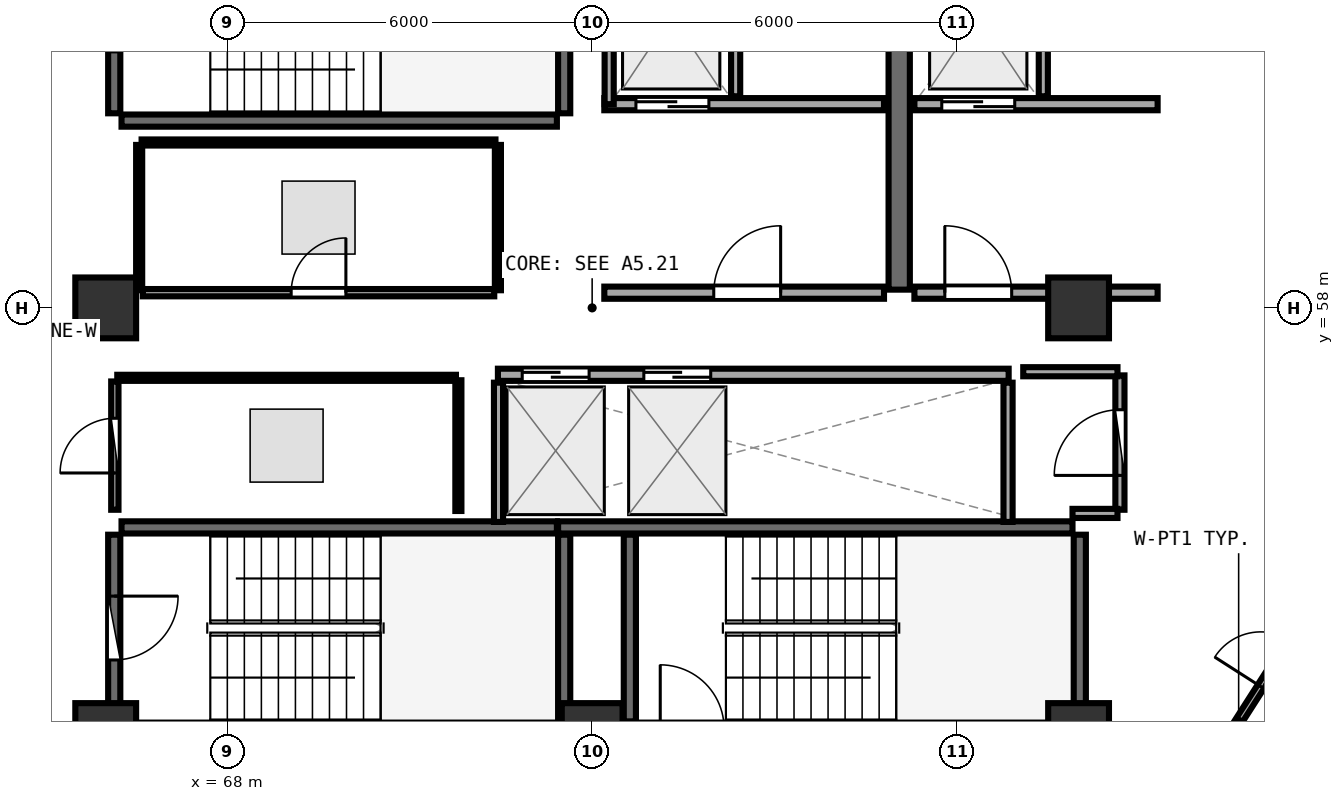
"""IFC4 building model, lengths in metres.
Left out: names, types, materials, properties, quantities, classifications, styles, units other than length and angle.
Written with IfcOpenShell. Run it as: python <this file> out.ifc"""

import sys

from ifc_helpers import new_model, si_unit, direction, frame, frame_2d, origin, origin_2d, place, context, subcontext, project, spatial, rectangle, extrude, element, fill, save


model = new_model("IFC4")
c1 = context("Model", 3, precision=1e-05, world=origin(), true_north=direction((0.0, 1.0)))
c2 = subcontext(c1, "Body", "Model", "MODEL_VIEW")
j1 = project(units=[si_unit("LENGTHUNIT", "METRE"), si_unit("PLANEANGLEUNIT", "RADIAN")], contexts=[c1])
p1 = place(None, origin())
s1 = spatial("IfcSite", under=j1, at=p1, CompositionType="ELEMENT")
p2 = place(p1, origin())
s2 = spatial("IfcBuilding", under=s1, at=p2, CompositionType="ELEMENT")
p3 = place(p2, frame((0.0, 0.0, 271.2)))
s3 = spatial("IfcBuildingStorey", under=s2, at=p3, CompositionType="ELEMENT", Elevation=271.2)
for number, where, z_axis, x_axis in (
    (1, (66.0, 51.0, 0.0), (0.0, 0.0, 1.0), (1.0, 0.0, 0.0)),
    (2, (74.0, 51.0, 0.0), (0.0, 0.0, 1.0), (1.0, 0.0, 0.0)),
    (3, (82.0, 51.0, 0.0), (0.0, 0.0, 1.0), (1.0, 0.0, 0.0)),
    (4, (82.0, 58.0, 0.0), (0.0, 0.0, 1.0), (1.0, 0.0, 0.0)),
    (5, (66.0, 58.0, 0.0), (0.0, 0.0, 1.0), (1.0, 0.0, 0.0)),
):
    element("IfcColumn", number, at=place(p3, frame(where, z_axis=z_axis, x_axis=x_axis)), inside=s3, PredefinedType="PILASTER", context=c2, shape_type="SweptSolid", body=[
        extrude(rectangle(XDim=1.0, YDim=1.0, at=origin_2d()), origin(), (0.0, 0.0, 1.0), 3.75),
    ])
p4 = place(p3, frame((66.26, 61.08, 0.0), z_axis=(0.0, 0.0, 1.0), x_axis=(1.0, 0.0, 0.0)))
e6 = element("IfcWall", 6, at=p4, inside=s3, PredefinedType="SHEAR", context=c2, shape_type="SweptSolid", body=[
    extrude(rectangle(XDim=7.16, YDim=0.2, at=frame_2d((3.58, 0.0))), origin(), (0.0, 0.0, 1.0), 3.49),
])
p5 = place(p3, frame((73.54, 61.2, 0.0), z_axis=(0.0, 0.0, 1.0), x_axis=(0.0, 1.0, 0.0)))
e7 = element("IfcWall", 7, at=p5, inside=s3, PredefinedType="SHEAR", context=c2, shape_type="SweptSolid", body=[
    extrude(rectangle(XDim=3.07, YDim=0.2, at=frame_2d((1.535, 0.0))), origin(), (0.0, 0.0, 1.0), 3.49),
])
p6 = place(p3, frame((66.14, 64.27, 0.0), z_axis=(0.0, 0.0, 1.0), x_axis=(0.0, -1.0, 0.0)))
e8 = element("IfcWall", 8, at=p6, inside=s3, PredefinedType="SHEAR", context=c2, shape_type="SweptSolid", body=[
    extrude(rectangle(XDim=3.07, YDim=0.2, at=frame_2d((1.535, 0.0))), origin(), (0.0, 0.0, 1.0), 3.49),
])
p7 = place(p6, frame((1.01, 0.0, 0.0)))
e9 = element("IfcOpeningElement", 9, at=p7, cuts=e8, PredefinedType="OPENING", context=c2, shape_type="SweptSolid", body=[
    extrude(rectangle(XDim=1.05, YDim=2.1, at=frame_2d((0.525, 1.05))), frame((0.0, 0.11, 0.0), z_axis=(0.0, -1.0, 0.0), x_axis=(1.0, 0.0, 0.0)), (0.0, 0.0, 1.0), 0.22),
])
p8 = place(p3, frame((82.02, 51.2, 0.0), z_axis=(0.0, 0.0, 1.0), x_axis=(0.0, 1.0, 0.0)))
e10 = element("IfcWall", 10, at=p8, inside=s3, PredefinedType="SHEAR", context=c2, shape_type="SweptSolid", body=[
    extrude(rectangle(XDim=3.07, YDim=0.2, at=frame_2d((1.535, 0.0))), origin(), (0.0, 0.0, 1.0), 3.49),
])
p9 = place(p3, frame((81.9, 54.39, 0.0), z_axis=(0.0, 0.0, 1.0), x_axis=(-1.0, 0.0, 0.0)))
e11 = element("IfcWall", 11, at=p9, inside=s3, PredefinedType="SHEAR", context=c2, shape_type="SweptSolid", body=[
    extrude(rectangle(XDim=8.46, YDim=0.2, at=frame_2d((4.23, 0.0))), origin(), (0.0, 0.0, 1.0), 3.49),
])
for number, where, z_axis, x_axis in (
    (12, (74.62, 54.27, 0.0), (0.0, 0.0, 1.0), (0.0, -1.0, 0.0)),
    (13, (73.54, 51.2, 0.0), (0.0, 0.0, 1.0), (0.0, 1.0, 0.0)),
):
    element("IfcWall", number, at=place(p3, frame(where, z_axis=z_axis, x_axis=x_axis)), inside=s3, PredefinedType="SHEAR", context=c2, shape_type="SweptSolid", body=[
        extrude(rectangle(XDim=3.07, YDim=0.2, at=frame_2d((1.535, 0.0))), origin(), (0.0, 0.0, 1.0), 3.49),
    ])
p10 = place(p3, frame((73.42, 54.39, 0.0), z_axis=(0.0, 0.0, 1.0), x_axis=(-1.0, 0.0, 0.0)))
e14 = element("IfcWall", 14, at=p10, inside=s3, PredefinedType="SHEAR", context=c2, shape_type="SweptSolid", body=[
    extrude(rectangle(XDim=7.16, YDim=0.2, at=frame_2d((3.58, 0.0))), origin(), (0.0, 0.0, 1.0), 3.49),
])
p11 = place(p3, frame((66.14, 54.27, 0.0), z_axis=(0.0, 0.0, 1.0), x_axis=(0.0, -1.0, 0.0)))
e15 = element("IfcWall", 15, at=p11, inside=s3, PredefinedType="SHEAR", context=c2, shape_type="SweptSolid", body=[
    extrude(rectangle(XDim=3.07, YDim=0.2, at=frame_2d((1.535, 0.0))), origin(), (0.0, 0.0, 1.0), 3.49),
])
p12 = place(p11, frame((1.01, 0.0, 0.0)))
e16 = element("IfcOpeningElement", 16, at=p12, cuts=e15, PredefinedType="OPENING", context=c2, shape_type="SweptSolid", body=[
    extrude(rectangle(XDim=1.05, YDim=2.1, at=frame_2d((0.525, 1.05))), frame((0.0, 0.11, 0.0), z_axis=(0.0, -1.0, 0.0), x_axis=(1.0, 0.0, 0.0)), (0.0, 0.0, 1.0), 0.22),
])
p13 = place(p3, frame((79.05, 58.3, 0.0), z_axis=(0.0, 0.0, 1.0), x_axis=(0.0, 1.0, 0.0)))
e17 = element("IfcWall", 17, at=p13, inside=s3, PredefinedType="SHEAR", context=c2, shape_type="SweptSolid", body=[
    extrude(rectangle(XDim=6.3, YDim=0.35, at=frame_2d((3.15, 0.0))), origin(), (0.0, 0.0, 1.0), 3.49),
])
p14 = place(p3, frame((74.2, 61.35, 0.0), z_axis=(0.0, 0.0, 1.0), x_axis=(1.0, 0.0, 0.0)))
e18 = element("IfcWall", 18, at=p14, inside=s3, PredefinedType="SOLIDWALL", context=c2, shape_type="SweptSolid", body=[
    extrude(rectangle(XDim=4.6, YDim=0.2, at=frame_2d((2.3, 0.0))), origin(), (0.0, 0.0, 1.0), 3.48),
])
p15 = place(p14, frame((0.52, 0.0, 0.0)))
e19 = element("IfcOpeningElement", 19, at=p15, cuts=e18, PredefinedType="OPENING", context=c2, shape_type="SweptSolid", body=[
    extrude(rectangle(XDim=1.2, YDim=2.15, at=frame_2d((0.6, 1.075))), frame((0.0, 0.11, 0.0), z_axis=(0.0, -1.0, 0.0), x_axis=(1.0, 0.0, 0.0)), (0.0, 0.0, 1.0), 0.22),
])
p16 = place(p3, frame((74.28, 61.35, 0.0), z_axis=(0.0, 0.0, 1.0), x_axis=(0.0, 1.0, 0.0)))
e20 = element("IfcWall", 20, at=p16, inside=s3, PredefinedType="PARTITIONING", context=c2, shape_type="SweptSolid", body=[
    extrude(rectangle(XDim=2.97, YDim=0.15, at=frame_2d((1.485, 0.0))), origin(), (0.0, 0.0, 1.0), 3.48),
])
p17 = place(p3, frame((76.36, 61.48, 0.0), z_axis=(0.0, 0.0, 1.0), x_axis=(0.0, 1.0, 0.0)))
e21 = element("IfcWall", 21, at=p17, inside=s3, PredefinedType="PARTITIONING", context=c2, shape_type="SweptSolid", body=[
    extrude(rectangle(XDim=2.84, YDim=0.15, at=frame_2d((1.42, 0.0))), origin(), (0.0, 0.0, 1.0), 3.48),
])
p18 = place(p3, frame((79.3, 61.35, 0.0), z_axis=(0.0, 0.0, 1.0), x_axis=(1.0, 0.0, 0.0)))
e22 = element("IfcWall", 22, at=p18, inside=s3, PredefinedType="SOLIDWALL", context=c2, shape_type="SweptSolid", body=[
    extrude(rectangle(XDim=4.0, YDim=0.2, at=frame_2d((2.0, 0.0))), origin(), (0.0, 0.0, 1.0), 2.775),
])
p19 = place(p18, frame((0.45, 0.0, 0.0)))
e23 = element("IfcOpeningElement", 23, at=p19, cuts=e22, PredefinedType="OPENING", context=c2, shape_type="SweptSolid", body=[
    extrude(rectangle(XDim=1.2, YDim=2.15, at=frame_2d((0.6, 1.075))), frame((0.0, 0.11, 0.0), z_axis=(0.0, -1.0, 0.0), x_axis=(1.0, 0.0, 0.0)), (0.0, 0.0, 1.0), 0.22),
])
p20 = place(p3, frame((81.42, 61.48, 0.0), z_axis=(0.0, 0.0, 1.0), x_axis=(0.0, 1.0, 0.0)))
e24 = element("IfcWall", 24, at=p20, inside=s3, PredefinedType="PARTITIONING", context=c2, shape_type="SweptSolid", body=[
    extrude(rectangle(XDim=2.84, YDim=0.15, at=frame_2d((1.42, 0.0))), origin(), (0.0, 0.0, 1.0), 3.48),
])
p21 = place(p3, frame((74.2, 58.25, 0.0), z_axis=(0.0, 0.0, 1.0), x_axis=(1.0, 0.0, 0.0)))
e25 = element("IfcWall", 25, at=p21, inside=s3, PredefinedType="SOLIDWALL", context=c2, shape_type="SweptSolid", body=[
    extrude(rectangle(XDim=4.6, YDim=0.2, at=frame_2d((2.3, 0.0))), origin(), (0.0, 0.0, 1.0), 3.48),
])
p22 = place(p21, frame((1.8, 0.0, 0.0)))
e26 = element("IfcOpeningElement", 26, at=p22, cuts=e25, PredefinedType="OPENING", context=c2, shape_type="SweptSolid", body=[
    extrude(rectangle(XDim=1.1, YDim=2.1, at=frame_2d((0.55, 1.05))), frame((0.0, 0.11, 0.0), z_axis=(0.0, -1.0, 0.0), x_axis=(1.0, 0.0, 0.0)), (0.0, 0.0, 1.0), 0.22),
])
p23 = place(p3, frame((79.3, 58.25, 0.0), z_axis=(0.0, 0.0, 1.0), x_axis=(1.0, 0.0, 0.0)))
e27 = element("IfcWall", 27, at=p23, inside=s3, PredefinedType="SOLIDWALL", context=c2, shape_type="SweptSolid", body=[
    extrude(rectangle(XDim=4.0, YDim=0.2, at=frame_2d((2.0, 0.0))), origin(), (0.0, 0.0, 1.0), 2.775),
])
p24 = place(p23, frame((0.5, 0.0, 0.0)))
e28 = element("IfcOpeningElement", 28, at=p24, cuts=e27, PredefinedType="OPENING", context=c2, shape_type="SweptSolid", body=[
    extrude(rectangle(XDim=1.1, YDim=2.1, at=frame_2d((0.55, 1.05))), frame((0.0, 0.11, 0.0), z_axis=(0.0, -1.0, 0.0), x_axis=(1.0, 0.0, 0.0)), (0.0, 0.0, 1.0), 0.22),
])
p25 = place(p3, frame((72.45, 56.9, 0.0), z_axis=(0.0, 0.0, 1.0), x_axis=(1.0, 0.0, 0.0)))
e29 = element("IfcWall", 29, at=p25, inside=s3, PredefinedType="SOLIDWALL", context=c2, shape_type="SweptSolid", body=[
    extrude(rectangle(XDim=8.4, YDim=0.2, at=frame_2d((4.2, 0.0))), origin(), (0.0, 0.0, 1.0), 3.48),
])
p26 = place(p25, frame((0.4, 0.0, 0.0)))
e30 = element("IfcOpeningElement", 30, at=p26, cuts=e29, PredefinedType="OPENING", context=c2, shape_type="SweptSolid", body=[
    extrude(rectangle(XDim=1.1, YDim=2.1, at=frame_2d((0.55, 1.05))), frame((0.0, 0.11, 0.0), z_axis=(0.0, -1.0, 0.0), x_axis=(1.0, 0.0, 0.0)), (0.0, 0.0, 1.0), 0.22),
])
p27 = place(p25, frame((2.4, 0.0, 0.0)))
e31 = element("IfcOpeningElement", 31, at=p27, cuts=e29, PredefinedType="OPENING", context=c2, shape_type="SweptSolid", body=[
    extrude(rectangle(XDim=1.1, YDim=2.1, at=frame_2d((0.55, 1.05))), frame((0.0, 0.11, 0.0), z_axis=(0.0, -1.0, 0.0), x_axis=(1.0, 0.0, 0.0)), (0.0, 0.0, 1.0), 0.22),
])
for number, where, z_axis, x_axis in (
    (32, (72.46, 54.48, 0.0), (0.0, 0.0, 1.0), (0.0, 1.0, 0.0)),
    (33, (80.84, 54.48, 0.0), (0.0, 0.0, 1.0), (0.0, 1.0, 0.0)),
):
    element("IfcWall", number, at=place(p3, frame(where, z_axis=z_axis, x_axis=x_axis)), inside=s3, PredefinedType="PARTITIONING", context=c2, shape_type="SweptSolid", body=[
        extrude(rectangle(XDim=2.29, YDim=0.15, at=frame_2d((1.145, 0.0))), origin(), (0.0, 0.0, 1.0), 3.48),
    ])
p28 = place(p3, frame((82.68, 54.68, 0.0), z_axis=(0.0, 0.0, 1.0), x_axis=(0.0, 1.0, 0.0)))
e34 = element("IfcWall", 34, at=p28, inside=s3, PredefinedType="PARTITIONING", context=c2, shape_type="SweptSolid", body=[
    extrude(rectangle(XDim=2.21, YDim=0.15, at=frame_2d((1.105, 0.0))), origin(), (0.0, 0.0, 1.0), 3.48),
])
p29 = place(p28, frame((0.565, 0.0, 0.0)))
e35 = element("IfcOpeningElement", 35, at=p29, cuts=e34, PredefinedType="OPENING", context=c2, shape_type="SweptSolid", body=[
    extrude(rectangle(XDim=1.08, YDim=2.1, at=frame_2d((0.54, 1.05))), frame((0.0, 0.085, 0.0), z_axis=(0.0, -1.0, 0.0), x_axis=(1.0, 0.0, 0.0)), (0.0, 0.0, 1.0), 0.17),
])
p30 = place(p3, frame((66.61, 58.25, 0.0), z_axis=(0.0, 0.0, 1.0), x_axis=(1.0, 0.0, 0.0)))
e36 = element("IfcWall", 36, at=p30, inside=s3, PredefinedType="PARTITIONING", context=c2, shape_type="SweptSolid", body=[
    extrude(rectangle(XDim=5.78, YDim=0.12, at=frame_2d((2.89, 0.0))), origin(), (0.0, 0.0, 1.0), 3.48),
])
p31 = place(p30, frame((2.44, 0.0, 0.0)))
e37 = element("IfcOpeningElement", 37, at=p31, cuts=e36, PredefinedType="OPENING", context=c2, shape_type="SweptSolid", body=[
    extrude(rectangle(XDim=0.9, YDim=2.08, at=frame_2d((0.45, 1.04))), frame((0.0, 0.07, 0.0), z_axis=(0.0, -1.0, 0.0), x_axis=(1.0, 0.0, 0.0)), (0.0, 0.0, 1.0), 0.14),
])
p32 = place(p3, frame((66.15, 54.68, 0.0), z_axis=(0.0, 0.0, 1.0), x_axis=(0.0, 1.0, 0.0)))
e38 = element("IfcWall", 38, at=p32, inside=s3, PredefinedType="PARTITIONING", context=c2, shape_type="SweptSolid", body=[
    extrude(rectangle(XDim=2.11, YDim=0.12, at=frame_2d((1.055, 0.0))), origin(), (0.0, 0.0, 1.0), 2.775),
])
p33 = place(p32, frame((0.605, 0.0, 0.0)))
e39 = element("IfcOpeningElement", 39, at=p33, cuts=e38, PredefinedType="OPENING", context=c2, shape_type="SweptSolid", body=[
    extrude(rectangle(XDim=0.9, YDim=2.08, at=frame_2d((0.45, 1.04))), frame((0.0, 0.07, 0.0), z_axis=(0.0, -1.0, 0.0), x_axis=(1.0, 0.0, 0.0)), (0.0, 0.0, 1.0), 0.14),
])
p34 = place(p3, frame((84.156, 50.458, 0.0), z_axis=(0.0, 0.0, 1.0), x_axis=(0.539324099435, 0.842098281538, 0.0)))
e40 = element("IfcWall", 40, at=p34, inside=s3, PredefinedType="PARTITIONING", context=c2, shape_type="SweptSolid", body=[
    extrude(rectangle(XDim=4.022, YDim=0.12, at=frame_2d((2.011, 0.0))), origin(), (0.0, 0.0, 1.0), 3.075),
])
p35 = place(p34, frame((1.561, 0.0, 0.0)))
e41 = element("IfcOpeningElement", 41, at=p35, cuts=e40, PredefinedType="OPENING", context=c2, shape_type="SweptSolid", body=[
    extrude(rectangle(XDim=0.9, YDim=2.08, at=frame_2d((0.45, 1.04))), frame((0.0, 0.07, 0.0), z_axis=(0.0, -1.0, 0.0), x_axis=(1.0, 0.0, 0.0)), (0.0, 0.0, 1.0), 0.14),
])
p36 = place(p3, frame((81.9, 54.62, 0.0), z_axis=(0.0, 0.0, 1.0), x_axis=(1.0, 0.0, 0.0)))
e42 = element("IfcWall", 42, at=p36, inside=s3, PredefinedType="PARTITIONING", context=c2, shape_type="SweptSolid", body=[
    extrude(rectangle(XDim=0.74, YDim=0.15, at=frame_2d((0.37, 0.0))), origin(), (0.0, 0.0, 1.0), 2.775),
])
p37 = place(p3, frame((82.64, 56.95, 0.0), z_axis=(0.0, 0.0, 1.0), x_axis=(-1.0, 0.0, 0.0)))
e43 = element("IfcWall", 43, at=p37, inside=s3, PredefinedType="PARTITIONING", context=c2, shape_type="SweptSolid", body=[
    extrude(rectangle(XDim=1.55, YDim=0.15, at=frame_2d((0.775, 0.0))), origin(), (0.0, 0.0, 1.0), 2.775),
])
p38 = place(p3, frame((72.45, 58.29, 0.0), z_axis=(0.0, 0.0, 1.0), x_axis=(0.0, 1.0, 0.0)))
e44 = element("IfcWall", 44, at=p38, inside=s3, PredefinedType="PARTITIONING", context=c2, shape_type="SweptSolid", body=[
    extrude(rectangle(XDim=2.39, YDim=0.1, at=frame_2d((1.195, 0.0))), origin(), (0.0, 0.0, 1.0), 3.48),
])
p39 = place(p3, frame((72.41, 60.72, 0.0), z_axis=(0.0, 0.0, 1.0), x_axis=(-1.0, 0.0, 0.0)))
e45 = element("IfcWall", 45, at=p39, inside=s3, PredefinedType="PARTITIONING", context=c2, shape_type="SweptSolid", body=[
    extrude(rectangle(XDim=5.82, YDim=0.1, at=frame_2d((2.91, 0.0))), origin(), (0.0, 0.0, 1.0), 3.48),
])
p40 = place(p3, frame((66.55, 60.68, 0.0), z_axis=(0.0, 0.0, 1.0), x_axis=(0.0, -1.0, 0.0)))
e46 = element("IfcWall", 46, at=p40, inside=s3, PredefinedType="PARTITIONING", context=c2, shape_type="SweptSolid", body=[
    extrude(rectangle(XDim=2.39, YDim=0.1, at=frame_2d((1.195, 0.0))), origin(), (0.0, 0.0, 1.0), 3.48),
])
p41 = place(p3, frame((71.8, 54.66, 0.0), z_axis=(0.0, 0.0, 1.0), x_axis=(0.0, 1.0, 0.0)))
e47 = element("IfcWall", 47, at=p41, inside=s3, PredefinedType="PARTITIONING", context=c2, shape_type="SweptSolid", body=[
    extrude(rectangle(XDim=2.15, YDim=0.1, at=frame_2d((1.075, 0.0))), origin(), (0.0, 0.0, 1.0), 3.48),
])
p42 = place(p3, frame((71.76, 56.85, 0.0), z_axis=(0.0, 0.0, 1.0), x_axis=(-1.0, 0.0, 0.0)))
e48 = element("IfcWall", 48, at=p42, inside=s3, PredefinedType="PARTITIONING", context=c2, shape_type="SweptSolid", body=[
    extrude(rectangle(XDim=5.57, YDim=0.1, at=frame_2d((2.785, 0.0))), origin(), (0.0, 0.0, 1.0), 2.775),
])
p43 = place(p12, origin())
e49 = element("IfcDoor", 49, at=p43, inside=s3, OperationType="SINGLE_SWING_LEFT", PredefinedType="DOOR", context=c2, shape_type="SweptSolid", body=[
    extrude(rectangle(XDim=1.05, YDim=2.1, at=frame_2d((0.525, 1.05))), frame((0.0, 0.025, 0.0), z_axis=(0.0, -1.0, 0.0), x_axis=(1.0, 0.0, 0.0)), (0.0, 0.0, 1.0), 0.05),
])
fill(e16, e49)
p44 = place(p15, origin())
e50 = element("IfcDoor", 50, at=p44, inside=s3, OperationType="DOUBLE_DOOR_SLIDING", PredefinedType="DOOR", context=c2, shape_type="SweptSolid", body=[
    extrude(rectangle(XDim=1.2, YDim=2.15, at=frame_2d((0.6, 1.075))), frame((0.0, 0.025, 0.0), z_axis=(0.0, -1.0, 0.0), x_axis=(1.0, 0.0, 0.0)), (0.0, 0.0, 1.0), 0.05),
])
fill(e19, e50)
p45 = place(p19, origin())
e51 = element("IfcDoor", 51, at=p45, inside=s3, OperationType="DOUBLE_DOOR_SLIDING", PredefinedType="DOOR", context=c2, shape_type="SweptSolid", body=[
    extrude(rectangle(XDim=1.2, YDim=2.15, at=frame_2d((0.6, 1.075))), frame((0.0, 0.025, 0.0), z_axis=(0.0, -1.0, 0.0), x_axis=(1.0, 0.0, 0.0)), (0.0, 0.0, 1.0), 0.05),
])
fill(e23, e51)
p46 = place(p22, frame((1.1, 0.0, 0.0), z_axis=(0.0, 0.0, 1.0), x_axis=(-1.0, 0.0, 0.0)))
e52 = element("IfcDoor", 52, at=p46, inside=s3, OperationType="SINGLE_SWING_LEFT", PredefinedType="DOOR", context=c2, shape_type="SweptSolid", body=[
    extrude(rectangle(XDim=1.1, YDim=2.1, at=frame_2d((0.55, 1.05))), frame((0.0, 0.025, 0.0), z_axis=(0.0, -1.0, 0.0), x_axis=(1.0, 0.0, 0.0)), (0.0, 0.0, 1.0), 0.05),
])
fill(e26, e52)
p47 = place(p24, frame((1.1, 0.0, 0.0), z_axis=(0.0, 0.0, 1.0), x_axis=(-1.0, 0.0, 0.0)))
e53 = element("IfcDoor", 53, at=p47, inside=s3, OperationType="SINGLE_SWING_RIGHT", PredefinedType="DOOR", context=c2, shape_type="SweptSolid", body=[
    extrude(rectangle(XDim=1.1, YDim=2.1, at=frame_2d((0.55, 1.05))), frame((0.0, 0.025, 0.0), z_axis=(0.0, -1.0, 0.0), x_axis=(1.0, 0.0, 0.0)), (0.0, 0.0, 1.0), 0.05),
])
fill(e28, e53)
p48 = place(p26, origin())
e54 = element("IfcDoor", 54, at=p48, inside=s3, OperationType="DOUBLE_DOOR_SLIDING", PredefinedType="DOOR", context=c2, shape_type="SweptSolid", body=[
    extrude(rectangle(XDim=1.1, YDim=2.1, at=frame_2d((0.55, 1.05))), frame((0.0, 0.025, 0.0), z_axis=(0.0, -1.0, 0.0), x_axis=(1.0, 0.0, 0.0)), (0.0, 0.0, 1.0), 0.05),
])
fill(e30, e54)
p49 = place(p27, origin())
e55 = element("IfcDoor", 55, at=p49, inside=s3, OperationType="DOUBLE_DOOR_SLIDING", PredefinedType="DOOR", context=c2, shape_type="SweptSolid", body=[
    extrude(rectangle(XDim=1.1, YDim=2.1, at=frame_2d((0.55, 1.05))), frame((0.0, 0.025, 0.0), z_axis=(0.0, -1.0, 0.0), x_axis=(1.0, 0.0, 0.0)), (0.0, 0.0, 1.0), 0.05),
])
fill(e31, e55)
p50 = place(p29, origin())
e56 = element("IfcDoor", 56, at=p50, inside=s3, OperationType="SINGLE_SWING_LEFT", PredefinedType="DOOR", context=c2, shape_type="SweptSolid", body=[
    extrude(rectangle(XDim=1.08, YDim=2.1, at=frame_2d((0.54, 1.05))), frame((0.0, 0.025, 0.0), z_axis=(0.0, -1.0, 0.0), x_axis=(1.0, 0.0, 0.0)), (0.0, 0.0, 1.0), 0.05),
])
fill(e35, e56)
p51 = place(p31, origin())
e57 = element("IfcDoor", 57, at=p51, inside=s3, OperationType="SINGLE_SWING_RIGHT", PredefinedType="DOOR", context=c2, shape_type="SweptSolid", body=[
    extrude(rectangle(XDim=0.9, YDim=2.08, at=frame_2d((0.45, 1.04))), frame((0.0, 0.025, 0.0), z_axis=(0.0, -1.0, 0.0), x_axis=(1.0, 0.0, 0.0)), (0.0, 0.0, 1.0), 0.05),
])
fill(e37, e57)
p52 = place(p33, origin())
e58 = element("IfcDoor", 58, at=p52, inside=s3, OperationType="SINGLE_SWING_LEFT", PredefinedType="DOOR", context=c2, shape_type="SweptSolid", body=[
    extrude(rectangle(XDim=0.9, YDim=2.08, at=frame_2d((0.45, 1.04))), frame((0.0, 0.025, 0.0), z_axis=(0.0, -1.0, 0.0), x_axis=(1.0, 0.0, 0.0)), (0.0, 0.0, 1.0), 0.05),
])
fill(e39, e58)
p53 = place(p35, origin())
e59 = element("IfcDoor", 59, at=p53, inside=s3, OperationType="SINGLE_SWING_LEFT", PredefinedType="DOOR", context=c2, shape_type="SweptSolid", body=[
    extrude(rectangle(XDim=0.9, YDim=2.08, at=frame_2d((0.45, 1.04))), frame((0.0, 0.025, 0.0), z_axis=(0.0, -1.0, 0.0), x_axis=(1.0, 0.0, 0.0)), (0.0, 0.0, 1.0), 0.05),
])
fill(e41, e59)
save(model, sys.argv[1])
